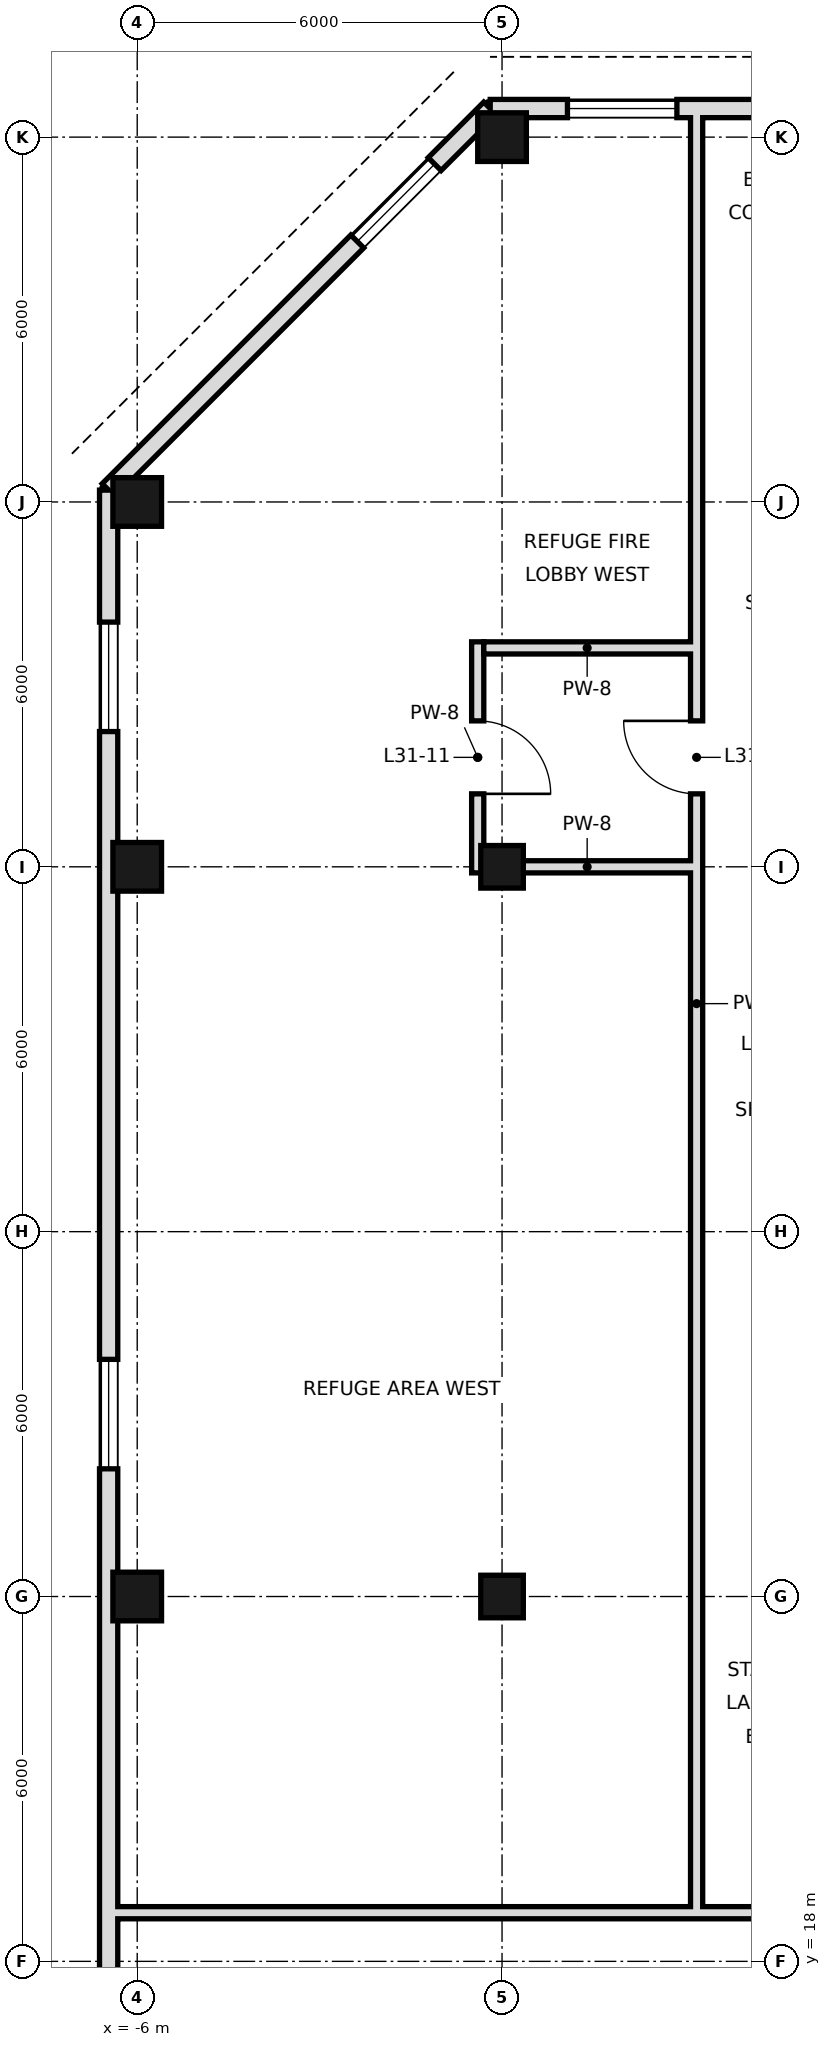
"""IFC4 building model, lengths in metres.
Left out: names, types, materials, properties, quantities, classifications, styles, units other than length and angle.
Written with IfcOpenShell. Run it as: python <this file> out.ifc"""

import sys

from ifc_helpers import new_model, si_unit, direction, frame, frame_2d, origin, origin_2d, place, context, subcontext, project, spatial, rectangle, hollow_rectangle, extrude, element, fill, save


model = new_model("IFC4")
c1 = context("Model", 3, precision=1e-05, world=origin(), true_north=direction((0.0, 1.0)))
c2 = subcontext(c1, "Body", "Model", "MODEL_VIEW")
j1 = project(units=[si_unit("LENGTHUNIT", "METRE"), si_unit("PLANEANGLEUNIT", "RADIAN")], contexts=[c1])
p1 = place(None, origin())
s1 = spatial("IfcSite", under=j1, at=p1, CompositionType="ELEMENT")
p2 = place(p1, origin())
s2 = spatial("IfcBuilding", under=s1, at=p2, CompositionType="ELEMENT")
p3 = place(p2, frame((0.0, 0.0, 138.4)))
s3 = spatial("IfcBuildingStorey", under=s2, at=p3, CompositionType="ELEMENT", Elevation=138.4)
for number, where, z_axis, x_axis in (
    (1, (-6.0, 24.0, 0.0), (0.0, 0.0, 1.0), (1.0, 0.0, 0.0)),
    (2, (-6.0, 36.0, 0.0), (0.0, 0.0, 1.0), (1.0, 0.0, 0.0)),
    (3, (-6.0, 42.0, 0.0), (0.0, 0.0, 1.0), (1.0, 0.0, 0.0)),
):
    element("IfcColumn", number, at=place(p3, frame(where, z_axis=z_axis, x_axis=x_axis)), inside=s3, PredefinedType="COLUMN", context=c2, shape_type="SweptSolid", body=[
        extrude(hollow_rectangle(XDim=0.8, YDim=0.8, WallThickness=0.04, at=origin_2d()), origin(), (0.0, 0.0, 1.0), 5.4),
    ])
for number, where, z_axis, x_axis in (
    (4, (0.0, 24.0, 0.0), (0.0, 0.0, 1.0), (1.0, 0.0, 0.0)),
    (5, (0.0, 36.0, 0.0), (0.0, 0.0, 1.0), (1.0, 0.0, 0.0)),
):
    element("IfcColumn", number, at=place(p3, frame(where, z_axis=z_axis, x_axis=x_axis)), inside=s3, PredefinedType="COLUMN", context=c2, shape_type="SweptSolid", body=[
        extrude(hollow_rectangle(XDim=0.7, YDim=0.7, WallThickness=0.036, at=origin_2d()), origin(), (0.0, 0.0, 1.0), 5.4),
    ])
p4 = place(p3, frame((0.0, 48.0, 0.0), z_axis=(0.0, 0.0, 1.0), x_axis=(1.0, 0.0, 0.0)))
e6 = element("IfcColumn", 6, at=p4, inside=s3, PredefinedType="COLUMN", context=c2, shape_type="SweptSolid", body=[
    extrude(hollow_rectangle(XDim=0.8, YDim=0.8, WallThickness=0.04, at=origin_2d()), origin(), (0.0, 0.0, 1.0), 5.4),
])
p5 = place(p3, frame((54.195, 48.47, 0.0), z_axis=(0.0, 0.0, 1.0), x_axis=(-1.0, 0.0, 0.0)))
e7 = element("IfcWall", 7, at=p5, inside=s3, PredefinedType="SOLIDWALL", context=c2, shape_type="SweptSolid", body=[
    extrude(rectangle(XDim=54.389, YDim=0.3, at=frame_2d((27.195, 0.0))), origin(), (0.0, 0.0, 1.0), 5.22),
])
p6 = place(p5, frame((2.17, 0.0, 0.9)))
e8 = element("IfcOpeningElement", 8, at=p6, cuts=e7, PredefinedType="OPENING", context=c2, shape_type="SweptSolid", body=[
    extrude(rectangle(XDim=1.8, YDim=1.5, at=frame_2d((0.9, 0.75))), frame((0.0, 0.16, 0.0), z_axis=(0.0, -1.0, 0.0), x_axis=(1.0, 0.0, 0.0)), (0.0, 0.0, 1.0), 0.32),
])
p7 = place(p5, frame((14.295, 0.0, 0.9)))
e9 = element("IfcOpeningElement", 9, at=p7, cuts=e7, PredefinedType="OPENING", context=c2, shape_type="SweptSolid", body=[
    extrude(rectangle(XDim=1.8, YDim=1.5, at=frame_2d((0.9, 0.75))), frame((0.0, 0.16, 0.0), z_axis=(0.0, -1.0, 0.0), x_axis=(1.0, 0.0, 0.0)), (0.0, 0.0, 1.0), 0.32),
])
p8 = place(p5, frame((26.295, 0.0, 0.9)))
e10 = element("IfcOpeningElement", 10, at=p8, cuts=e7, PredefinedType="OPENING", context=c2, shape_type="SweptSolid", body=[
    extrude(rectangle(XDim=1.8, YDim=1.5, at=frame_2d((0.9, 0.75))), frame((0.0, 0.16, 0.0), z_axis=(0.0, -1.0, 0.0), x_axis=(1.0, 0.0, 0.0)), (0.0, 0.0, 1.0), 0.32),
])
p9 = place(p5, frame((38.295, 0.0, 0.9)))
e11 = element("IfcOpeningElement", 11, at=p9, cuts=e7, PredefinedType="OPENING", context=c2, shape_type="SweptSolid", body=[
    extrude(rectangle(XDim=1.8, YDim=1.5, at=frame_2d((0.9, 0.75))), frame((0.0, 0.16, 0.0), z_axis=(0.0, -1.0, 0.0), x_axis=(1.0, 0.0, 0.0)), (0.0, 0.0, 1.0), 0.32),
])
p10 = place(p5, frame((51.319, 0.0, 0.9)))
e12 = element("IfcOpeningElement", 12, at=p10, cuts=e7, PredefinedType="OPENING", context=c2, shape_type="SweptSolid", body=[
    extrude(rectangle(XDim=1.8, YDim=1.5, at=frame_2d((0.9, 0.75))), frame((0.0, 0.16, 0.0), z_axis=(0.0, -1.0, 0.0), x_axis=(1.0, 0.0, 0.0)), (0.0, 0.0, 1.0), 0.32),
])
p11 = place(p3, frame((-0.195, 48.47, 0.0), z_axis=(0.0, 0.0, 1.0), x_axis=(-0.707106781187, -0.707106781187, 0.0)))
e13 = element("IfcWall", 13, at=p11, inside=s3, PredefinedType="SOLIDWALL", context=c2, shape_type="SweptSolid", body=[
    extrude(rectangle(XDim=8.875, YDim=0.3, at=frame_2d((4.438, 0.0))), origin(), (0.0, 0.0, 1.0), 5.22),
])
p12 = place(p11, frame((1.292, 0.0, 0.9)))
e14 = element("IfcOpeningElement", 14, at=p12, cuts=e13, PredefinedType="OPENING", context=c2, shape_type="SweptSolid", body=[
    extrude(rectangle(XDim=1.8, YDim=1.5, at=frame_2d((0.9, 0.75))), frame((0.0, 0.16, 0.0), z_axis=(0.0, -1.0, 0.0), x_axis=(1.0, 0.0, 0.0)), (0.0, 0.0, 1.0), 0.32),
])
p13 = place(p3, frame((-6.47, 42.195, 0.0), z_axis=(0.0, 0.0, 1.0), x_axis=(0.0, -1.0, 0.0)))
e15 = element("IfcWall", 15, at=p13, inside=s3, PredefinedType="SOLIDWALL", context=c2, shape_type="SweptSolid", body=[
    extrude(rectangle(XDim=36.389, YDim=0.3, at=frame_2d((18.195, 0.0))), origin(), (0.0, 0.0, 1.0), 5.22),
])
p14 = place(p13, frame((2.17, 0.0, 0.9)))
e16 = element("IfcOpeningElement", 16, at=p14, cuts=e15, PredefinedType="OPENING", context=c2, shape_type="SweptSolid", body=[
    extrude(rectangle(XDim=1.8, YDim=1.5, at=frame_2d((0.9, 0.75))), frame((0.0, 0.16, 0.0), z_axis=(0.0, -1.0, 0.0), x_axis=(1.0, 0.0, 0.0)), (0.0, 0.0, 1.0), 0.32),
])
p15 = place(p13, frame((14.295, 0.0, 0.9)))
e17 = element("IfcOpeningElement", 17, at=p15, cuts=e15, PredefinedType="OPENING", context=c2, shape_type="SweptSolid", body=[
    extrude(rectangle(XDim=1.8, YDim=1.5, at=frame_2d((0.9, 0.75))), frame((0.0, 0.16, 0.0), z_axis=(0.0, -1.0, 0.0), x_axis=(1.0, 0.0, 0.0)), (0.0, 0.0, 1.0), 0.32),
])
p16 = place(p13, frame((26.295, 0.0, 0.9)))
e18 = element("IfcOpeningElement", 18, at=p16, cuts=e15, PredefinedType="OPENING", context=c2, shape_type="SweptSolid", body=[
    extrude(rectangle(XDim=1.8, YDim=1.5, at=frame_2d((0.9, 0.75))), frame((0.0, 0.16, 0.0), z_axis=(0.0, -1.0, 0.0), x_axis=(1.0, 0.0, 0.0)), (0.0, 0.0, 1.0), 0.32),
])
p17 = place(p3, frame((-0.4, 35.9, 0.0), z_axis=(0.0, 0.0, 1.0), x_axis=(0.0, 1.0, 0.0)))
e19 = element("IfcWall", 19, at=p17, inside=s3, PredefinedType="SOLIDWALL", context=c2, shape_type="SweptSolid", body=[
    extrude(rectangle(XDim=3.8, YDim=0.2, at=frame_2d((1.9, 0.0))), origin(), (0.0, 0.0, 1.0), 5.22),
])
p18 = place(p17, frame((1.3, 0.0, 0.0)))
e20 = element("IfcOpeningElement", 20, at=p18, cuts=e19, PredefinedType="OPENING", context=c2, shape_type="SweptSolid", body=[
    extrude(rectangle(XDim=1.2, YDim=2.4, at=frame_2d((0.6, 1.2))), frame((0.0, 0.11, 0.0), z_axis=(0.0, -1.0, 0.0), x_axis=(1.0, 0.0, 0.0)), (0.0, 0.0, 1.0), 0.22),
])
p19 = place(p3, frame((3.2, 18.9, 0.0), z_axis=(0.0, 0.0, 1.0), x_axis=(0.0, 1.0, 0.0)))
e21 = element("IfcWall", 21, at=p19, inside=s3, PredefinedType="SOLIDWALL", context=c2, shape_type="SweptSolid", body=[
    extrude(rectangle(XDim=29.7, YDim=0.2, at=frame_2d((14.85, 0.0))), origin(), (0.0, 0.0, 1.0), 4.52),
])
p20 = place(p19, frame((18.3, 0.0, 0.0)))
e22 = element("IfcOpeningElement", 22, at=p20, cuts=e21, PredefinedType="OPENING", context=c2, shape_type="SweptSolid", body=[
    extrude(rectangle(XDim=1.2, YDim=2.4, at=frame_2d((0.6, 1.2))), frame((0.0, 0.11, 0.0), z_axis=(0.0, -1.0, 0.0), x_axis=(1.0, 0.0, 0.0)), (0.0, 0.0, 1.0), 0.22),
])
p21 = place(p3, frame((-6.6, 18.8, 0.0), z_axis=(0.0, 0.0, 1.0), x_axis=(1.0, 0.0, 0.0)))
e23 = element("IfcWall", 23, at=p21, inside=s3, PredefinedType="SOLIDWALL", context=c2, shape_type="SweptSolid", body=[
    extrude(rectangle(XDim=67.2, YDim=0.2, at=frame_2d((33.6, 0.0))), origin(), (0.0, 0.0, 1.0), 4.52),
])
p22 = place(p21, frame((17.2, 0.0, 0.0)))
e24 = element("IfcOpeningElement", 24, at=p22, cuts=e23, PredefinedType="OPENING", context=c2, shape_type="SweptSolid", body=[
    extrude(rectangle(XDim=1.2, YDim=2.4, at=frame_2d((0.6, 1.2))), frame((0.0, 0.11, 0.0), z_axis=(0.0, -1.0, 0.0), x_axis=(1.0, 0.0, 0.0)), (0.0, 0.0, 1.0), 0.22),
])
p23 = place(p3, frame((-0.3, 36.0, 0.0), z_axis=(0.0, 0.0, 1.0), x_axis=(1.0, 0.0, 0.0)))
e25 = element("IfcWall", 25, at=p23, inside=s3, PredefinedType="SOLIDWALL", context=c2, shape_type="SweptSolid", body=[
    extrude(rectangle(XDim=3.4, YDim=0.2, at=frame_2d((1.7, 0.0))), origin(), (0.0, 0.0, 1.0), 5.22),
])
p24 = place(p3, frame((-0.3, 39.6, 0.0), z_axis=(0.0, 0.0, 1.0), x_axis=(1.0, 0.0, 0.0)))
e26 = element("IfcWall", 26, at=p24, inside=s3, PredefinedType="SOLIDWALL", context=c2, shape_type="SweptSolid", body=[
    extrude(rectangle(XDim=3.4, YDim=0.2, at=frame_2d((1.7, 0.0))), origin(), (0.0, 0.0, 1.0), 4.52),
])
p25 = place(p10, origin())
e27 = element("IfcWindow", 27, at=p25, inside=s3, PartitioningType="SINGLE_PANEL", PredefinedType="WINDOW", context=c2, shape_type="SweptSolid", body=[
    extrude(rectangle(XDim=1.8, YDim=1.5, at=frame_2d((0.9, 0.75))), frame((0.0, 0.03, 0.0), z_axis=(0.0, -1.0, 0.0), x_axis=(1.0, 0.0, 0.0)), (0.0, 0.0, 1.0), 0.06),
])
fill(e12, e27)
p26 = place(p12, origin())
e28 = element("IfcWindow", 28, at=p26, inside=s3, PartitioningType="SINGLE_PANEL", PredefinedType="WINDOW", context=c2, shape_type="SweptSolid", body=[
    extrude(rectangle(XDim=1.8, YDim=1.5, at=frame_2d((0.9, 0.75))), frame((0.0, 0.03, 0.0), z_axis=(0.0, -1.0, 0.0), x_axis=(1.0, 0.0, 0.0)), (0.0, 0.0, 1.0), 0.06),
])
fill(e14, e28)
p27 = place(p14, origin())
e29 = element("IfcWindow", 29, at=p27, inside=s3, PartitioningType="SINGLE_PANEL", PredefinedType="WINDOW", context=c2, shape_type="SweptSolid", body=[
    extrude(rectangle(XDim=1.8, YDim=1.5, at=frame_2d((0.9, 0.75))), frame((0.0, 0.03, 0.0), z_axis=(0.0, -1.0, 0.0), x_axis=(1.0, 0.0, 0.0)), (0.0, 0.0, 1.0), 0.06),
])
fill(e16, e29)
p28 = place(p15, origin())
e30 = element("IfcWindow", 30, at=p28, inside=s3, PartitioningType="SINGLE_PANEL", PredefinedType="WINDOW", context=c2, shape_type="SweptSolid", body=[
    extrude(rectangle(XDim=1.8, YDim=1.5, at=frame_2d((0.9, 0.75))), frame((0.0, 0.03, 0.0), z_axis=(0.0, -1.0, 0.0), x_axis=(1.0, 0.0, 0.0)), (0.0, 0.0, 1.0), 0.06),
])
fill(e17, e30)
p29 = place(p18, frame((1.2, 0.0, 0.0), z_axis=(0.0, 0.0, 1.0), x_axis=(-1.0, 0.0, 0.0)))
e31 = element("IfcDoor", 31, at=p29, inside=s3, OperationType="SINGLE_SWING_RIGHT", PredefinedType="DOOR", context=c2, shape_type="SweptSolid", body=[
    extrude(rectangle(XDim=1.2, YDim=2.4, at=frame_2d((0.6, 1.2))), frame((0.0, 0.025, 0.0), z_axis=(0.0, -1.0, 0.0), x_axis=(1.0, 0.0, 0.0)), (0.0, 0.0, 1.0), 0.05),
])
fill(e20, e31)
p30 = place(p20, frame((1.2, 0.0, 0.0), z_axis=(0.0, 0.0, 1.0), x_axis=(-1.0, 0.0, 0.0)))
e32 = element("IfcDoor", 32, at=p30, inside=s3, OperationType="SINGLE_SWING_LEFT", PredefinedType="DOOR", context=c2, shape_type="SweptSolid", body=[
    extrude(rectangle(XDim=1.2, YDim=2.4, at=frame_2d((0.6, 1.2))), frame((0.0, 0.025, 0.0), z_axis=(0.0, -1.0, 0.0), x_axis=(1.0, 0.0, 0.0)), (0.0, 0.0, 1.0), 0.05),
])
fill(e22, e32)
save(model, sys.argv[1])
